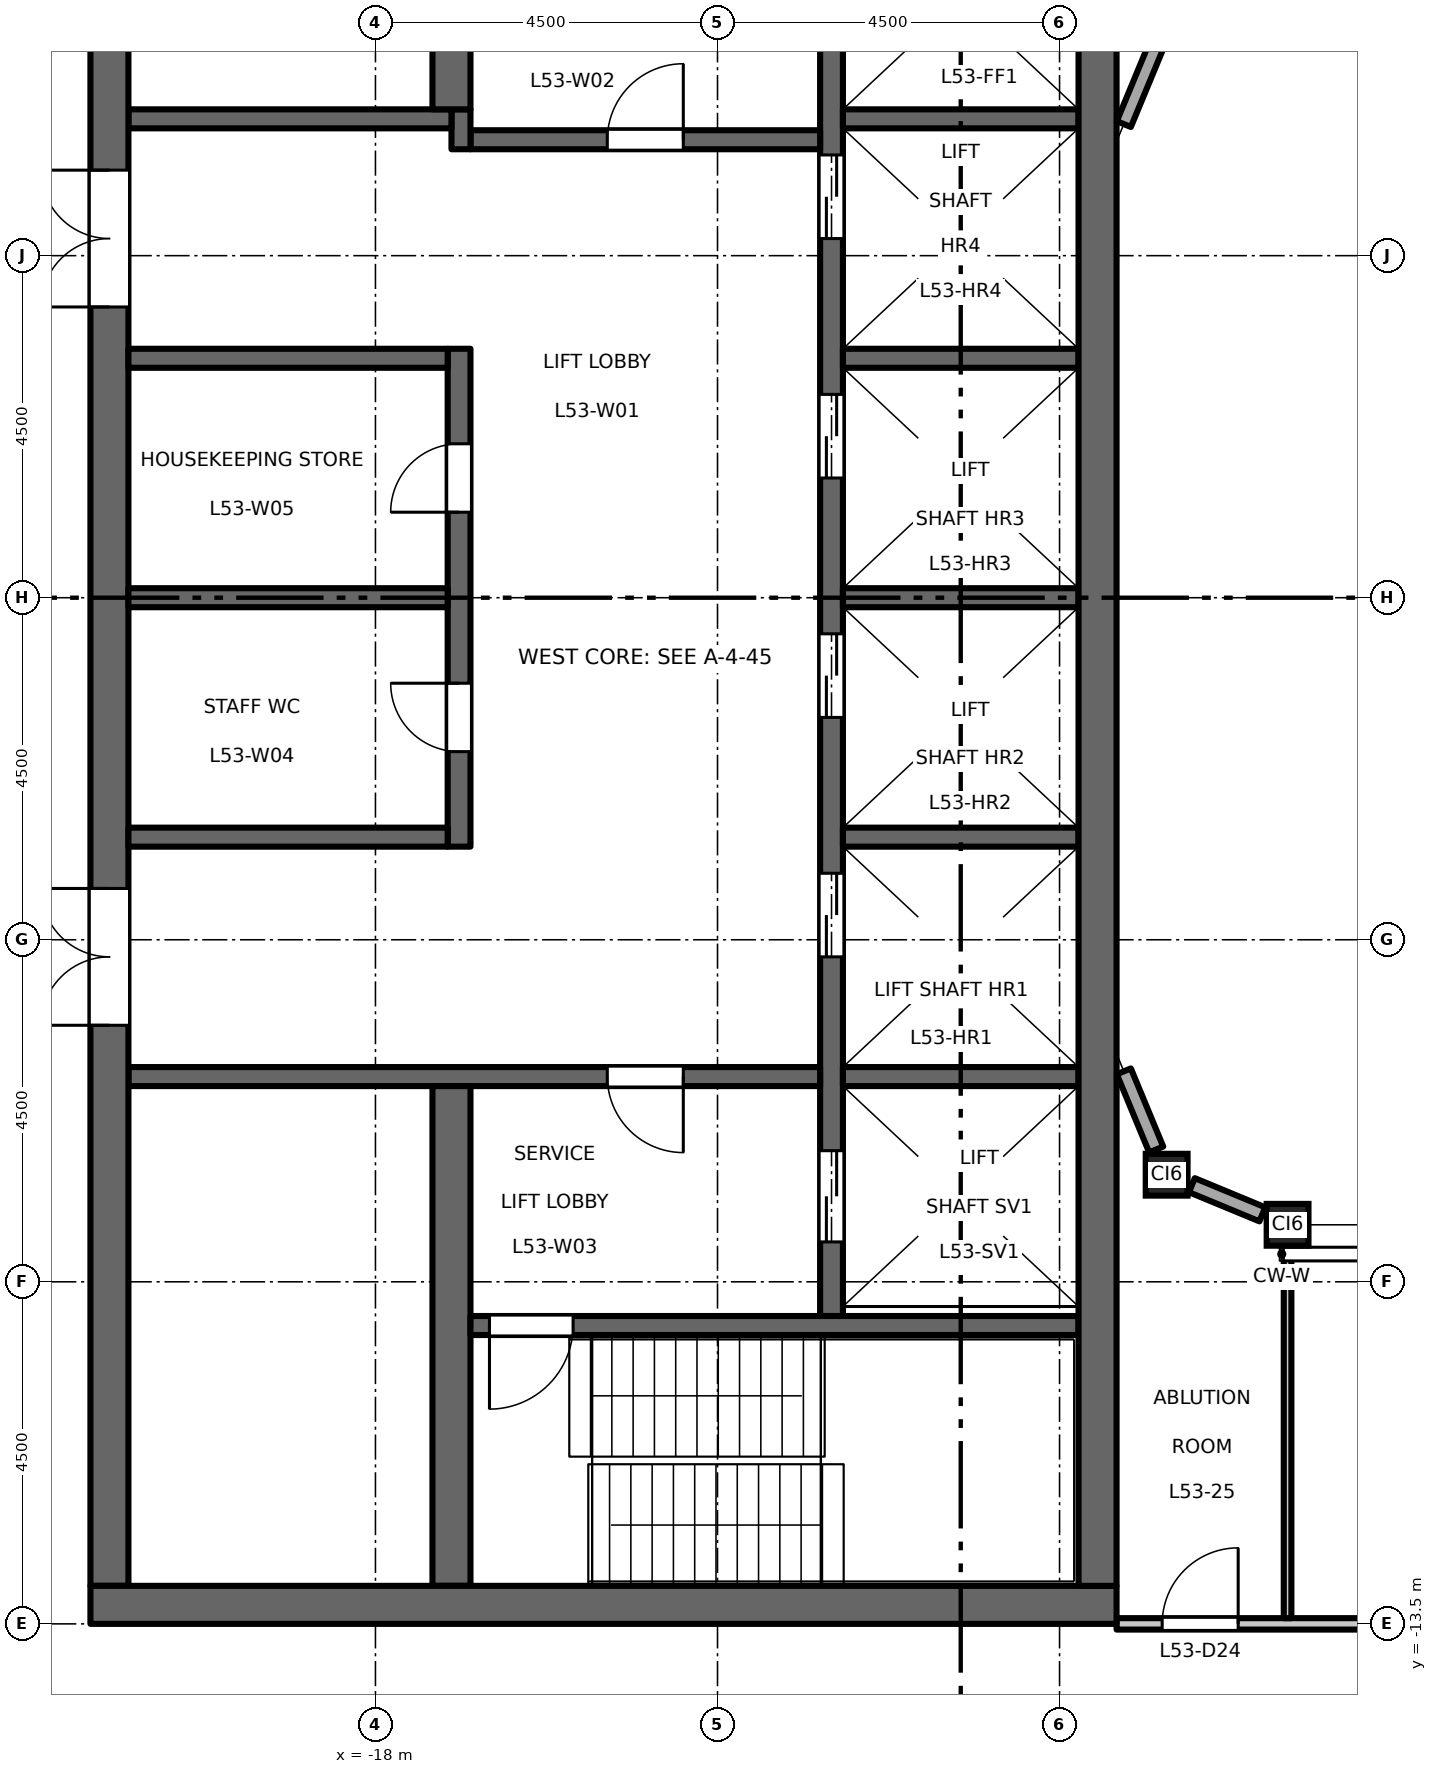
"""IFC4 building model, lengths in metres.
Left out: names, types, materials, properties, quantities, classifications, styles, units other than length and angle.
Written with IfcOpenShell. Run it as: python <this file> out.ifc"""

import sys

from ifc_helpers import new_model, si_unit, direction, frame, frame_2d, origin, origin_2d, place, context, subcontext, project, spatial, rectangle, hollow_rectangle, extrude, element, fill, save


model = new_model("IFC4")
c1 = context("Model", 3, precision=1e-05, world=origin(), true_north=direction((0.0, 1.0)))
c2 = subcontext(c1, "Body", "Model", "MODEL_VIEW")
j1 = project(units=[si_unit("LENGTHUNIT", "METRE"), si_unit("PLANEANGLEUNIT", "RADIAN")], contexts=[c1])
p1 = place(None, origin())
s1 = spatial("IfcSite", under=j1, at=p1, CompositionType="ELEMENT")
p2 = place(p1, origin())
s2 = spatial("IfcBuilding", under=s1, at=p2, CompositionType="ELEMENT")
p3 = place(p2, frame((0.0, 0.0, 246.7)))
s3 = spatial("IfcBuildingStorey", under=s2, at=p3, CompositionType="ELEMENT", Elevation=246.7)
for number, where, z_axis, x_axis in (
    (1, (-7.591, -7.591, 0.0), (0.0, 0.0, 1.0), (1.0, 0.0, 0.0)),
    (2, (-6.0, -8.25, 0.0), (0.0, 0.0, 1.0), (1.0, 0.0, 0.0)),
):
    element("IfcColumn", number, at=place(p3, frame(where, z_axis=z_axis, x_axis=x_axis)), inside=s3, PredefinedType="COLUMN", context=c2, shape_type="SweptSolid", body=[
        extrude(hollow_rectangle(XDim=0.55, YDim=0.55, WallThickness=0.028, at=origin_2d()), origin(), (0.0, 0.0, 1.0), 4.5),
    ])
p4 = place(p3, frame((-12.0, -9.45, 0.0), z_axis=(0.0, 0.0, 1.0), x_axis=(0.0, 1.0, 0.0)))
e3 = element("IfcWall", 3, at=p4, inside=s3, PredefinedType="SHEAR", context=c2, shape_type="SweptSolid", body=[
    extrude(rectangle(XDim=18.9, YDim=0.3, at=frame_2d((9.45, 0.0))), origin(), (0.0, 0.0, 1.0), 4.35),
])
p5 = place(p4, frame((4.725, 0.0, 0.0)))
e4 = element("IfcOpeningElement", 4, at=p5, cuts=e3, PredefinedType="OPENING", context=c2, shape_type="SweptSolid", body=[
    extrude(rectangle(XDim=1.1, YDim=2.1, at=frame_2d((0.55, 1.05))), frame((0.0, 0.16, 0.0), z_axis=(0.0, -1.0, 0.0), x_axis=(1.0, 0.0, 0.0)), (0.0, 0.0, 1.0), 0.32),
])
p6 = place(p4, frame((7.875, 0.0, 0.0)))
e5 = element("IfcOpeningElement", 5, at=p6, cuts=e3, PredefinedType="OPENING", context=c2, shape_type="SweptSolid", body=[
    extrude(rectangle(XDim=1.1, YDim=2.1, at=frame_2d((0.55, 1.05))), frame((0.0, 0.16, 0.0), z_axis=(0.0, -1.0, 0.0), x_axis=(1.0, 0.0, 0.0)), (0.0, 0.0, 1.0), 0.32),
])
p7 = place(p4, frame((11.025, 0.0, 0.0)))
e6 = element("IfcOpeningElement", 6, at=p7, cuts=e3, PredefinedType="OPENING", context=c2, shape_type="SweptSolid", body=[
    extrude(rectangle(XDim=1.1, YDim=2.1, at=frame_2d((0.55, 1.05))), frame((0.0, 0.16, 0.0), z_axis=(0.0, -1.0, 0.0), x_axis=(1.0, 0.0, 0.0)), (0.0, 0.0, 1.0), 0.32),
])
p8 = place(p4, frame((14.175, 0.0, 0.0)))
e7 = element("IfcOpeningElement", 7, at=p8, cuts=e3, PredefinedType="OPENING", context=c2, shape_type="SweptSolid", body=[
    extrude(rectangle(XDim=1.1, YDim=2.1, at=frame_2d((0.55, 1.05))), frame((0.0, 0.16, 0.0), z_axis=(0.0, -1.0, 0.0), x_axis=(1.0, 0.0, 0.0)), (0.0, 0.0, 1.0), 0.32),
])
p9 = place(p4, frame((16.725, 0.0, 0.0)))
e8 = element("IfcOpeningElement", 8, at=p9, cuts=e3, PredefinedType="OPENING", context=c2, shape_type="SweptSolid", body=[
    extrude(rectangle(XDim=1.2, YDim=2.1, at=frame_2d((0.6, 1.05))), frame((0.0, 0.16, 0.0), z_axis=(0.0, -1.0, 0.0), x_axis=(1.0, 0.0, 0.0)), (0.0, 0.0, 1.0), 0.32),
])
p10 = place(p4, frame((0.975, 0.0, 0.0)))
e9 = element("IfcOpeningElement", 9, at=p10, cuts=e3, PredefinedType="OPENING", context=c2, shape_type="SweptSolid", body=[
    extrude(rectangle(XDim=1.2, YDim=2.1, at=frame_2d((0.6, 1.05))), frame((0.0, 0.16, 0.0), z_axis=(0.0, -1.0, 0.0), x_axis=(1.0, 0.0, 0.0)), (0.0, 0.0, 1.0), 0.32),
])
p11 = place(p3, frame((-12.15, 6.025, 0.0), z_axis=(0.0, 0.0, 1.0), x_axis=(-1.0, 0.0, 0.0)))
e10 = element("IfcWall", 10, at=p11, inside=s3, PredefinedType="SHEAR", context=c2, shape_type="SweptSolid", body=[
    extrude(rectangle(XDim=4.6, YDim=0.25, at=frame_2d((2.3, 0.0))), origin(), (0.0, 0.0, 1.0), 4.35),
])
p12 = place(p11, frame((1.8, 0.0, 0.0)))
e11 = element("IfcOpeningElement", 11, at=p12, cuts=e10, PredefinedType="OPENING", context=c2, shape_type="SweptSolid", body=[
    extrude(rectangle(XDim=1.0, YDim=2.1, at=frame_2d((0.5, 1.05))), frame((0.0, 0.135, 0.0), z_axis=(0.0, -1.0, 0.0), x_axis=(1.0, 0.0, 0.0)), (0.0, 0.0, 1.0), 0.27),
])
p13 = place(p3, frame((-16.875, 5.9, 0.0), z_axis=(0.0, 0.0, 1.0), x_axis=(0.0, 1.0, 0.0)))
e12 = element("IfcWall", 12, at=p13, inside=s3, PredefinedType="SHEAR", context=c2, shape_type="SweptSolid", body=[
    extrude(rectangle(XDim=0.525, YDim=0.25, at=frame_2d((0.263, 0.0))), origin(), (0.0, 0.0, 1.0), 4.35),
])
p14 = place(p3, frame((-17.0, 6.3, 0.0), z_axis=(0.0, 0.0, 1.0), x_axis=(-1.0, 0.0, 0.0)))
e13 = element("IfcWall", 13, at=p14, inside=s3, PredefinedType="SHEAR", context=c2, shape_type="SweptSolid", body=[
    extrude(rectangle(XDim=4.25, YDim=0.25, at=frame_2d((2.125, 0.0))), origin(), (0.0, 0.0, 1.0), 4.35),
])
p15 = place(p3, frame((-12.15, -6.3, 0.0), z_axis=(0.0, 0.0, 1.0), x_axis=(-1.0, 0.0, 0.0)))
e14 = element("IfcWall", 14, at=p15, inside=s3, PredefinedType="SHEAR", context=c2, shape_type="SweptSolid", body=[
    extrude(rectangle(XDim=9.1, YDim=0.25, at=frame_2d((4.55, 0.0))), origin(), (0.0, 0.0, 1.0), 4.35),
])
p16 = place(p15, frame((1.8, 0.0, 0.0)))
e15 = element("IfcOpeningElement", 15, at=p16, cuts=e14, PredefinedType="OPENING", context=c2, shape_type="SweptSolid", body=[
    extrude(rectangle(XDim=1.0, YDim=2.1, at=frame_2d((0.5, 1.05))), frame((0.0, 0.135, 0.0), z_axis=(0.0, -1.0, 0.0), x_axis=(1.0, 0.0, 0.0)), (0.0, 0.0, 1.0), 0.27),
])
p17 = place(p3, frame((-21.5, -13.0, 0.0), z_axis=(0.0, 0.0, 1.0), x_axis=(0.0, 1.0, 0.0)))
e16 = element("IfcWall", 16, at=p17, inside=s3, PredefinedType="SHEAR", context=c2, shape_type="SweptSolid", body=[
    extrude(rectangle(XDim=26.0, YDim=0.5, at=frame_2d((13.0, 0.0))), origin(), (0.0, 0.0, 1.0), 4.35),
])
p18 = place(p17, frame((16.825, 0.0, 0.0)))
e17 = element("IfcOpeningElement", 17, at=p18, cuts=e16, PredefinedType="OPENING", context=c2, shape_type="SweptSolid", body=[
    extrude(rectangle(XDim=1.8, YDim=2.1, at=frame_2d((0.9, 1.05))), frame((0.0, 0.26, 0.0), z_axis=(0.0, -1.0, 0.0), x_axis=(1.0, 0.0, 0.0)), (0.0, 0.0, 1.0), 0.52),
])
p19 = place(p17, frame((7.375, 0.0, 0.0)))
e18 = element("IfcOpeningElement", 18, at=p19, cuts=e16, PredefinedType="OPENING", context=c2, shape_type="SweptSolid", body=[
    extrude(rectangle(XDim=1.8, YDim=2.1, at=frame_2d((0.9, 1.05))), frame((0.0, 0.26, 0.0), z_axis=(0.0, -1.0, 0.0), x_axis=(1.0, 0.0, 0.0)), (0.0, 0.0, 1.0), 0.52),
])
p20 = place(p3, frame((-16.9, -3.275, 0.0), z_axis=(0.0, 0.0, 1.0), x_axis=(0.0, 1.0, 0.0)))
e19 = element("IfcWall", 19, at=p20, inside=s3, PredefinedType="SHEAR", context=c2, shape_type="SweptSolid", body=[
    extrude(rectangle(XDim=6.55, YDim=0.3, at=frame_2d((3.275, 0.0))), origin(), (0.0, 0.0, 1.0), 4.35),
])
p21 = place(p20, frame((1.25, 0.0, 0.0)))
e20 = element("IfcOpeningElement", 20, at=p21, cuts=e19, PredefinedType="OPENING", context=c2, shape_type="SweptSolid", body=[
    extrude(rectangle(XDim=0.9, YDim=2.1, at=frame_2d((0.45, 1.05))), frame((0.0, 0.16, 0.0), z_axis=(0.0, -1.0, 0.0), x_axis=(1.0, 0.0, 0.0)), (0.0, 0.0, 1.0), 0.32),
])
p22 = place(p20, frame((4.4, 0.0, 0.0)))
e21 = element("IfcOpeningElement", 21, at=p22, cuts=e19, PredefinedType="OPENING", context=c2, shape_type="SweptSolid", body=[
    extrude(rectangle(XDim=0.9, YDim=2.1, at=frame_2d((0.45, 1.05))), frame((0.0, 0.16, 0.0), z_axis=(0.0, -1.0, 0.0), x_axis=(1.0, 0.0, 0.0)), (0.0, 0.0, 1.0), 0.32),
])
for number, where, z_axis, x_axis in (
    (22, (-17.05, 0.0, 0.0), (0.0, 0.0, 1.0), (-1.0, 0.0, 0.0)),
    (23, (-17.05, 3.15, 0.0), (0.0, 0.0, 1.0), (-1.0, 0.0, 0.0)),
    (24, (-17.05, -3.15, 0.0), (0.0, 0.0, 1.0), (-1.0, 0.0, 0.0)),
):
    element("IfcWall", number, at=place(p3, frame(where, z_axis=z_axis, x_axis=x_axis)), inside=s3, PredefinedType="SHEAR", context=c2, shape_type="SweptSolid", body=[
        extrude(rectangle(XDim=4.2, YDim=0.25, at=frame_2d((2.1, 0.0))), origin(), (0.0, 0.0, 1.0), 4.35),
    ])
for number, where, z_axis, x_axis in (
    (25, (-17.0, 6.425, 0.0), (0.0, 0.0, 1.0), (0.0, 1.0, 0.0)),
    (26, (-17.0, -13.0, 0.0), (0.0, 0.0, 1.0), (0.0, 1.0, 0.0)),
):
    element("IfcWall", number, at=place(p3, frame(where, z_axis=z_axis, x_axis=x_axis)), inside=s3, PredefinedType="SHEAR", context=c2, shape_type="SweptSolid", body=[
        extrude(rectangle(XDim=6.575, YDim=0.5, at=frame_2d((3.288, 0.0))), origin(), (0.0, 0.0, 1.0), 4.35),
    ])
for number, where, z_axis, x_axis in (
    (27, (-8.75, 0.0, 0.0), (0.0, 0.0, 1.0), (-1.0, 0.0, 0.0)),
    (28, (-8.75, 3.15, 0.0), (0.0, 0.0, 1.0), (-1.0, 0.0, 0.0)),
    (29, (-8.75, 6.3, 0.0), (0.0, 0.0, 1.0), (-1.0, 0.0, 0.0)),
    (30, (-8.75, -3.15, 0.0), (0.0, 0.0, 1.0), (-1.0, 0.0, 0.0)),
    (31, (-8.75, -6.3, 0.0), (0.0, 0.0, 1.0), (-1.0, 0.0, 0.0)),
):
    element("IfcWall", number, at=place(p3, frame(where, z_axis=z_axis, x_axis=x_axis)), inside=s3, PredefinedType="SHEAR", context=c2, shape_type="SweptSolid", body=[
        extrude(rectangle(XDim=3.1, YDim=0.25, at=frame_2d((1.55, 0.0))), origin(), (0.0, 0.0, 1.0), 4.35),
    ])
p23 = place(p3, frame((-8.75, -9.575, 0.0), z_axis=(0.0, 0.0, 1.0), x_axis=(-1.0, 0.0, 0.0)))
e32 = element("IfcWall", 32, at=p23, inside=s3, PredefinedType="SHEAR", context=c2, shape_type="SweptSolid", body=[
    extrude(rectangle(XDim=8.0, YDim=0.25, at=frame_2d((4.0, 0.0))), origin(), (0.0, 0.0, 1.0), 4.35),
])
p24 = place(p23, frame((6.65, 0.0, 0.0)))
e33 = element("IfcOpeningElement", 33, at=p24, cuts=e32, PredefinedType="OPENING", context=c2, shape_type="SweptSolid", body=[
    extrude(rectangle(XDim=1.1, YDim=2.1, at=frame_2d((0.55, 1.05))), frame((0.0, 0.135, 0.0), z_axis=(0.0, -1.0, 0.0), x_axis=(1.0, 0.0, 0.0)), (0.0, 0.0, 1.0), 0.27),
])
p25 = place(p3, frame((-8.25, -13.25, 0.0), z_axis=(0.0, 0.0, 1.0), x_axis=(-1.0, 0.0, 0.0)))
e34 = element("IfcWall", 34, at=p25, inside=s3, PredefinedType="SHEAR", context=c2, shape_type="SweptSolid", body=[
    extrude(rectangle(XDim=13.5, YDim=0.5, at=frame_2d((6.75, 0.0))), origin(), (0.0, 0.0, 1.0), 4.35),
])
p26 = place(p3, frame((-8.5, -13.0, 0.0), z_axis=(0.0, 0.0, 1.0), x_axis=(0.0, 1.0, 0.0)))
e35 = element("IfcWall", 35, at=p26, inside=s3, PredefinedType="SHEAR", context=c2, shape_type="SweptSolid", body=[
    extrude(rectangle(XDim=26.0, YDim=0.5, at=frame_2d((13.0, 0.0))), origin(), (0.0, 0.0, 1.0), 4.35),
])
for number, where, z_axis, x_axis in (
    (36, (-7.729, 7.259, 0.0), (0.0, 0.0, 1.0), (-0.383, -0.924, 0.0)),
    (37, (-8.154, -6.231, 0.0), (0.0, 0.0, 1.0), (0.383, -0.924, 0.0)),
):
    element("IfcWall", number, at=place(p3, frame(where, z_axis=z_axis, x_axis=x_axis)), inside=s3, PredefinedType="STANDARD", context=c2, shape_type="SweptSolid", body=[
        extrude(rectangle(XDim=1.113, YDim=0.2, at=frame_2d((0.556, 0.0))), origin(), (0.0, 0.0, 1.0), 3.918),
    ])
p27 = place(p3, frame((-7.259, -7.729, 0.0), z_axis=(0.0, 0.0, 1.0), x_axis=(0.923859650767, -0.382731427616, 0.0)))
e38 = element("IfcWall", 38, at=p27, inside=s3, PredefinedType="STANDARD", context=c2, shape_type="SweptSolid", body=[
    extrude(rectangle(XDim=1.003, YDim=0.2, at=frame_2d((0.502, 0.0))), origin(), (0.0, 0.0, 1.0), 3.918),
])
p28 = place(p3, frame((-8.25, -13.5, 0.0), z_axis=(0.0, 0.0, 1.0), x_axis=(1.0, 0.0, 0.0)))
e39 = element("IfcWall", 39, at=p28, inside=s3, PredefinedType="PARTITIONING", context=c2, shape_type="SweptSolid", body=[
    extrude(rectangle(XDim=16.5, YDim=0.15, at=frame_2d((8.25, 0.0))), origin(), (0.0, 0.0, 1.0), 3.95),
])
p29 = place(p28, frame((0.6, 0.0, 0.0)))
e40 = element("IfcOpeningElement", 40, at=p29, cuts=e39, PredefinedType="OPENING", context=c2, shape_type="SweptSolid", body=[
    extrude(rectangle(XDim=1.0, YDim=2.1, at=frame_2d((0.5, 1.05))), frame((0.0, 0.085, 0.0), z_axis=(0.0, -1.0, 0.0), x_axis=(1.0, 0.0, 0.0)), (0.0, 0.0, 1.0), 0.17),
])
p30 = place(p28, frame((14.85, 0.0, 0.0)))
e41 = element("IfcOpeningElement", 41, at=p30, cuts=e39, PredefinedType="OPENING", context=c2, shape_type="SweptSolid", body=[
    extrude(rectangle(XDim=1.0, YDim=2.1, at=frame_2d((0.5, 1.05))), frame((0.0, 0.085, 0.0), z_axis=(0.0, -1.0, 0.0), x_axis=(1.0, 0.0, 0.0)), (0.0, 0.0, 1.0), 0.17),
])
p31 = place(p3, frame((-6.0, -13.425, 0.0), z_axis=(0.0, 0.0, 1.0), x_axis=(0.0, 1.0, 0.0)))
e42 = element("IfcWall", 42, at=p31, inside=s3, PredefinedType="PARTITIONING", context=c2, shape_type="SweptSolid", body=[
    extrude(rectangle(XDim=4.825, YDim=0.1, at=frame_2d((2.413, 0.0))), origin(), (0.0, 0.0, 1.0), 4.35),
])
p32 = place(p12, origin())
e43 = element("IfcDoor", 43, at=p32, inside=s3, OperationType="SINGLE_SWING_LEFT", PredefinedType="DOOR", context=c2, shape_type="SweptSolid", body=[
    extrude(rectangle(XDim=1.0, YDim=2.1, at=frame_2d((0.5, 1.05))), frame((0.0, 0.025, 0.0), z_axis=(0.0, -1.0, 0.0), x_axis=(1.0, 0.0, 0.0)), (0.0, 0.0, 1.0), 0.05),
])
fill(e11, e43)
p33 = place(p16, origin())
e44 = element("IfcDoor", 44, at=p33, inside=s3, OperationType="SINGLE_SWING_RIGHT", PredefinedType="DOOR", context=c2, shape_type="SweptSolid", body=[
    extrude(rectangle(XDim=1.0, YDim=2.1, at=frame_2d((0.5, 1.05))), frame((0.0, 0.025, 0.0), z_axis=(0.0, -1.0, 0.0), x_axis=(1.0, 0.0, 0.0)), (0.0, 0.0, 1.0), 0.05),
])
fill(e15, e44)
p34 = place(p24, origin())
e45 = element("IfcDoor", 45, at=p34, inside=s3, OperationType="SINGLE_SWING_LEFT", PredefinedType="DOOR", context=c2, shape_type="SweptSolid", body=[
    extrude(rectangle(XDim=1.1, YDim=2.1, at=frame_2d((0.55, 1.05))), frame((0.0, 0.025, 0.0), z_axis=(0.0, -1.0, 0.0), x_axis=(1.0, 0.0, 0.0)), (0.0, 0.0, 1.0), 0.05),
])
fill(e33, e45)
p35 = place(p18, origin())
e46 = element("IfcDoor", 46, at=p35, inside=s3, OperationType="DOUBLE_DOOR_DOUBLE_SWING", PredefinedType="DOOR", context=c2, shape_type="SweptSolid", body=[
    extrude(rectangle(XDim=1.8, YDim=2.1, at=frame_2d((0.9, 1.05))), frame((0.0, 0.025, 0.0), z_axis=(0.0, -1.0, 0.0), x_axis=(1.0, 0.0, 0.0)), (0.0, 0.0, 1.0), 0.05),
])
fill(e17, e46)
p36 = place(p19, origin())
e47 = element("IfcDoor", 47, at=p36, inside=s3, OperationType="DOUBLE_DOOR_DOUBLE_SWING", PredefinedType="DOOR", context=c2, shape_type="SweptSolid", body=[
    extrude(rectangle(XDim=1.8, YDim=2.1, at=frame_2d((0.9, 1.05))), frame((0.0, 0.025, 0.0), z_axis=(0.0, -1.0, 0.0), x_axis=(1.0, 0.0, 0.0)), (0.0, 0.0, 1.0), 0.05),
])
fill(e18, e47)
p37 = place(p5, origin())
e48 = element("IfcDoor", 48, at=p37, inside=s3, OperationType="DOUBLE_DOOR_SLIDING", PredefinedType="DOOR", context=c2, shape_type="SweptSolid", body=[
    extrude(rectangle(XDim=1.1, YDim=2.1, at=frame_2d((0.55, 1.05))), frame((0.0, 0.025, 0.0), z_axis=(0.0, -1.0, 0.0), x_axis=(1.0, 0.0, 0.0)), (0.0, 0.0, 1.0), 0.05),
])
fill(e4, e48)
p38 = place(p6, origin())
e49 = element("IfcDoor", 49, at=p38, inside=s3, OperationType="DOUBLE_DOOR_SLIDING", PredefinedType="DOOR", context=c2, shape_type="SweptSolid", body=[
    extrude(rectangle(XDim=1.1, YDim=2.1, at=frame_2d((0.55, 1.05))), frame((0.0, 0.025, 0.0), z_axis=(0.0, -1.0, 0.0), x_axis=(1.0, 0.0, 0.0)), (0.0, 0.0, 1.0), 0.05),
])
fill(e5, e49)
p39 = place(p7, origin())
e50 = element("IfcDoor", 50, at=p39, inside=s3, OperationType="DOUBLE_DOOR_SLIDING", PredefinedType="DOOR", context=c2, shape_type="SweptSolid", body=[
    extrude(rectangle(XDim=1.1, YDim=2.1, at=frame_2d((0.55, 1.05))), frame((0.0, 0.025, 0.0), z_axis=(0.0, -1.0, 0.0), x_axis=(1.0, 0.0, 0.0)), (0.0, 0.0, 1.0), 0.05),
])
fill(e6, e50)
p40 = place(p8, origin())
e51 = element("IfcDoor", 51, at=p40, inside=s3, OperationType="DOUBLE_DOOR_SLIDING", PredefinedType="DOOR", context=c2, shape_type="SweptSolid", body=[
    extrude(rectangle(XDim=1.1, YDim=2.1, at=frame_2d((0.55, 1.05))), frame((0.0, 0.025, 0.0), z_axis=(0.0, -1.0, 0.0), x_axis=(1.0, 0.0, 0.0)), (0.0, 0.0, 1.0), 0.05),
])
fill(e7, e51)
p41 = place(p10, origin())
e52 = element("IfcDoor", 52, at=p41, inside=s3, OperationType="DOUBLE_DOOR_SLIDING", PredefinedType="DOOR", context=c2, shape_type="SweptSolid", body=[
    extrude(rectangle(XDim=1.2, YDim=2.1, at=frame_2d((0.6, 1.05))), frame((0.0, 0.025, 0.0), z_axis=(0.0, -1.0, 0.0), x_axis=(1.0, 0.0, 0.0)), (0.0, 0.0, 1.0), 0.05),
])
fill(e9, e52)
p42 = place(p21, origin())
e53 = element("IfcDoor", 53, at=p42, inside=s3, OperationType="SINGLE_SWING_LEFT", PredefinedType="DOOR", context=c2, shape_type="SweptSolid", body=[
    extrude(rectangle(XDim=0.9, YDim=2.1, at=frame_2d((0.45, 1.05))), frame((0.0, 0.025, 0.0), z_axis=(0.0, -1.0, 0.0), x_axis=(1.0, 0.0, 0.0)), (0.0, 0.0, 1.0), 0.05),
])
fill(e20, e53)
p43 = place(p22, origin())
e54 = element("IfcDoor", 54, at=p43, inside=s3, OperationType="SINGLE_SWING_RIGHT", PredefinedType="DOOR", context=c2, shape_type="SweptSolid", body=[
    extrude(rectangle(XDim=0.9, YDim=2.1, at=frame_2d((0.45, 1.05))), frame((0.0, 0.025, 0.0), z_axis=(0.0, -1.0, 0.0), x_axis=(1.0, 0.0, 0.0)), (0.0, 0.0, 1.0), 0.05),
])
fill(e21, e54)
p44 = place(p29, origin())
e55 = element("IfcDoor", 55, at=p44, inside=s3, OperationType="SINGLE_SWING_RIGHT", PredefinedType="DOOR", context=c2, shape_type="SweptSolid", body=[
    extrude(rectangle(XDim=1.0, YDim=2.1, at=frame_2d((0.5, 1.05))), frame((0.0, 0.025, 0.0), z_axis=(0.0, -1.0, 0.0), x_axis=(1.0, 0.0, 0.0)), (0.0, 0.0, 1.0), 0.05),
])
fill(e40, e55)
save(model, sys.argv[1])
